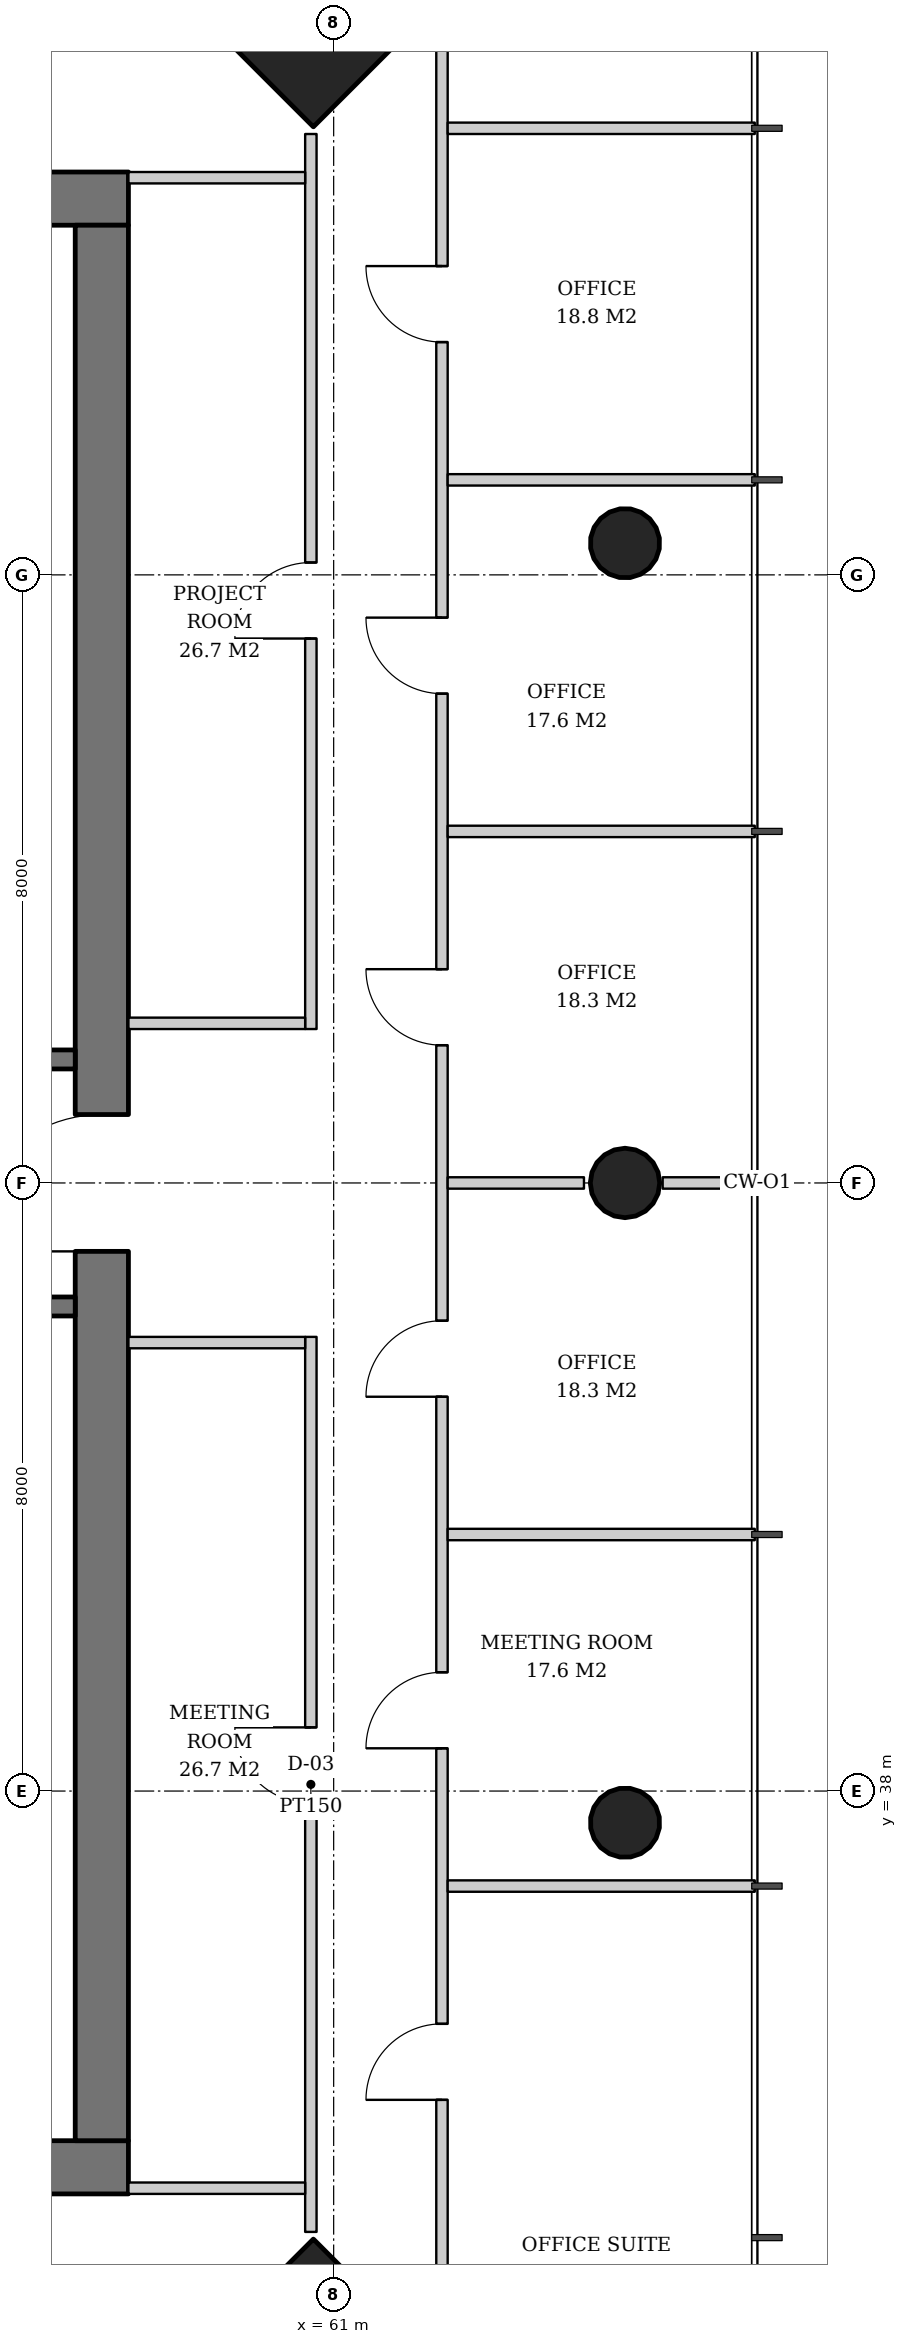
"""IFC4 building model, lengths in metres.
Left out: names, types, materials, properties, quantities, classifications, styles, units other than length and angle.
Written with IfcOpenShell. Run it as: python <this file> out.ifc"""

import sys

from ifc_helpers import new_model, si_unit, direction, frame, frame_2d, origin, origin_2d, place, context, subcontext, project, spatial, rectangle, hollow_circle, extrude, element, fill, save


model = new_model("IFC4")
c1 = context("Model", 3, precision=1e-05, world=origin(), true_north=direction((0.0, 1.0)))
c2 = subcontext(c1, "Body", "Model", "MODEL_VIEW")
j1 = project(units=[si_unit("LENGTHUNIT", "METRE"), si_unit("PLANEANGLEUNIT", "RADIAN")], contexts=[c1])
p1 = place(None, origin())
s1 = spatial("IfcSite", under=j1, at=p1, CompositionType="ELEMENT")
p2 = place(p1, origin())
s2 = spatial("IfcBuilding", under=s1, at=p2, CompositionType="ELEMENT")
p3 = place(p2, frame((0.0, 0.0, 150.2)))
s3 = spatial("IfcBuildingStorey", under=s2, at=p3, CompositionType="ELEMENT", Elevation=150.2)
p4 = place(p3, frame((60.771, 61.771, 0.0), z_axis=(-0.031962158256, -0.031962158256, 0.998977898093), x_axis=(0.707106781187, -0.707106781187, 0.0)))
e1 = element("IfcColumn", 1, at=p4, inside=s3, PredefinedType="COLUMN", context=c2, shape_type="SweptSolid", body=[
    extrude(rectangle(XDim=2.6, YDim=2.6, at=origin_2d()), origin(), (0.0, 0.0, 1.0), 3.804),
])
p5 = place(p3, frame((64.871, 37.564, 0.0), z_axis=(-0.031910269556, 0.015987237665, 0.999362868496), x_axis=(-0.447933021895, -0.894067115991, 0.0)))
e2 = element("IfcColumn", 2, at=p5, inside=s3, PredefinedType="COLUMN", context=c2, shape_type="SweptSolid", body=[
    extrude(hollow_circle(Radius=0.457, WallThickness=0.03, at=origin_2d()), origin(), (0.0, 0.0, 1.0), 3.802),
])
p6 = place(p3, frame((64.871, 46.0, 0.0), z_axis=(-0.031914348339, 0.0, 0.999490607445), x_axis=(0.0, -1.0, 0.0)))
e3 = element("IfcColumn", 3, at=p6, inside=s3, PredefinedType="COLUMN", context=c2, shape_type="SweptSolid", body=[
    extrude(hollow_circle(Radius=0.457, WallThickness=0.03, at=origin_2d()), origin(), (0.0, 0.0, 1.0), 3.802),
])
p7 = place(p3, frame((64.871, 54.436, 0.0), z_axis=(-0.031910269556, -0.015987237665, 0.999362868496), x_axis=(0.447933021895, -0.894067115991, 0.0)))
e4 = element("IfcColumn", 4, at=p7, inside=s3, PredefinedType="COLUMN", context=c2, shape_type="SweptSolid", body=[
    extrude(hollow_circle(Radius=0.457, WallThickness=0.03, at=origin_2d()), origin(), (0.0, 0.0, 1.0), 3.802),
])
p8 = place(p3, frame((60.771, 30.229, 0.0), z_axis=(-0.031962158256, 0.031962158256, 0.998977898093), x_axis=(-0.707106781187, -0.707106781187, 0.0)))
e5 = element("IfcColumn", 5, at=p8, inside=s3, PredefinedType="COLUMN", context=c2, shape_type="SweptSolid", body=[
    extrude(rectangle(XDim=2.6, YDim=2.6, at=origin_2d()), origin(), (0.0, 0.0, 1.0), 3.804),
])
p9 = place(p3, frame((31.7, 33.05, 0.0), z_axis=(0.0, 0.0, 1.0), x_axis=(1.0, 0.0, 0.0)))
e6 = element("IfcWall", 6, at=p9, inside=s3, PredefinedType="SHEAR", context=c2, shape_type="SweptSolid", body=[
    extrude(rectangle(XDim=26.6, YDim=0.7, at=frame_2d((13.3, 0.0))), origin(), (0.0, 0.0, 1.0), 3.8),
])
p10 = place(p9, frame((7.3, 0.0, 0.0)))
e7 = element("IfcOpeningElement", 7, at=p10, cuts=e6, PredefinedType="OPENING", context=c2, shape_type="SweptSolid", body=[
    extrude(rectangle(XDim=1.0, YDim=2.1, at=frame_2d((0.5, 1.05))), frame((0.0, 0.36, 0.0), z_axis=(0.0, -1.0, 0.0), x_axis=(1.0, 0.0, 0.0)), (0.0, 0.0, 1.0), 0.72),
])
p11 = place(p9, frame((18.75, 0.0, 0.0)))
e8 = element("IfcOpeningElement", 8, at=p11, cuts=e6, PredefinedType="OPENING", context=c2, shape_type="SweptSolid", body=[
    extrude(rectangle(XDim=1.0, YDim=2.1, at=frame_2d((0.5, 1.05))), frame((0.0, 0.36, 0.0), z_axis=(0.0, -1.0, 0.0), x_axis=(1.0, 0.0, 0.0)), (0.0, 0.0, 1.0), 0.72),
])
p12 = place(p9, frame((1.85, 0.0, 0.0)))
e9 = element("IfcOpeningElement", 9, at=p12, cuts=e6, PredefinedType="OPENING", context=c2, shape_type="SweptSolid", body=[
    extrude(rectangle(XDim=1.0, YDim=2.1, at=frame_2d((0.5, 1.05))), frame((0.0, 0.36, 0.0), z_axis=(0.0, -1.0, 0.0), x_axis=(1.0, 0.0, 0.0)), (0.0, 0.0, 1.0), 0.72),
])
p13 = place(p9, frame((4.7, 0.0, 0.0)))
e10 = element("IfcOpeningElement", 10, at=p13, cuts=e6, PredefinedType="OPENING", context=c2, shape_type="SweptSolid", body=[
    extrude(rectangle(XDim=1.0, YDim=2.1, at=frame_2d((0.5, 1.05))), frame((0.0, 0.36, 0.0), z_axis=(0.0, -1.0, 0.0), x_axis=(1.0, 0.0, 0.0)), (0.0, 0.0, 1.0), 0.72),
])
p14 = place(p9, frame((12.44, 0.0, 0.0)))
e11 = element("IfcOpeningElement", 11, at=p14, cuts=e6, PredefinedType="OPENING", context=c2, shape_type="SweptSolid", body=[
    extrude(rectangle(XDim=1.0, YDim=2.1, at=frame_2d((0.5, 1.05))), frame((0.0, 0.36, 0.0), z_axis=(0.0, -1.0, 0.0), x_axis=(1.0, 0.0, 0.0)), (0.0, 0.0, 1.0), 0.72),
])
p15 = place(p9, frame((20.644, 0.0, 0.0)))
e12 = element("IfcOpeningElement", 12, at=p15, cuts=e6, PredefinedType="OPENING", context=c2, shape_type="SweptSolid", body=[
    extrude(rectangle(XDim=1.0, YDim=2.1, at=frame_2d((0.5, 1.05))), frame((0.0, 0.36, 0.0), z_axis=(0.0, -1.0, 0.0), x_axis=(1.0, 0.0, 0.0)), (0.0, 0.0, 1.0), 0.72),
])
p16 = place(p9, frame((23.544, 0.0, 0.0)))
e13 = element("IfcOpeningElement", 13, at=p16, cuts=e6, PredefinedType="OPENING", context=c2, shape_type="SweptSolid", body=[
    extrude(rectangle(XDim=1.0, YDim=2.1, at=frame_2d((0.5, 1.05))), frame((0.0, 0.36, 0.0), z_axis=(0.0, -1.0, 0.0), x_axis=(1.0, 0.0, 0.0)), (0.0, 0.0, 1.0), 0.72),
])
p17 = place(p3, frame((31.7, 58.95, 0.0), z_axis=(0.0, 0.0, 1.0), x_axis=(1.0, 0.0, 0.0)))
e14 = element("IfcWall", 14, at=p17, inside=s3, PredefinedType="SHEAR", context=c2, shape_type="SweptSolid", body=[
    extrude(rectangle(XDim=26.6, YDim=0.7, at=frame_2d((13.3, 0.0))), origin(), (0.0, 0.0, 1.0), 3.8),
])
p18 = place(p17, frame((17.94, 0.0, 0.0)))
e15 = element("IfcOpeningElement", 15, at=p18, cuts=e14, PredefinedType="OPENING", context=c2, shape_type="SweptSolid", body=[
    extrude(rectangle(XDim=1.0, YDim=2.1, at=frame_2d((0.5, 1.05))), frame((0.0, 0.36, 0.0), z_axis=(0.0, -1.0, 0.0), x_axis=(1.0, 0.0, 0.0)), (0.0, 0.0, 1.0), 0.72),
])
p19 = place(p17, frame((5.825, 0.0, 0.0)))
e16 = element("IfcOpeningElement", 16, at=p19, cuts=e14, PredefinedType="OPENING", context=c2, shape_type="SweptSolid", body=[
    extrude(rectangle(XDim=1.0, YDim=2.1, at=frame_2d((0.5, 1.05))), frame((0.0, 0.36, 0.0), z_axis=(0.0, -1.0, 0.0), x_axis=(1.0, 0.0, 0.0)), (0.0, 0.0, 1.0), 0.72),
])
p20 = place(p17, frame((1.169, 0.0, 0.0)))
e17 = element("IfcOpeningElement", 17, at=p20, cuts=e14, PredefinedType="OPENING", context=c2, shape_type="SweptSolid", body=[
    extrude(rectangle(XDim=1.0, YDim=2.1, at=frame_2d((0.5, 1.05))), frame((0.0, 0.36, 0.0), z_axis=(0.0, -1.0, 0.0), x_axis=(1.0, 0.0, 0.0)), (0.0, 0.0, 1.0), 0.72),
])
p21 = place(p17, frame((2.683, 0.0, 0.0)))
e18 = element("IfcOpeningElement", 18, at=p21, cuts=e14, PredefinedType="OPENING", context=c2, shape_type="SweptSolid", body=[
    extrude(rectangle(XDim=1.0, YDim=2.1, at=frame_2d((0.5, 1.05))), frame((0.0, 0.36, 0.0), z_axis=(0.0, -1.0, 0.0), x_axis=(1.0, 0.0, 0.0)), (0.0, 0.0, 1.0), 0.72),
])
p22 = place(p17, frame((4.211, 0.0, 0.0)))
e19 = element("IfcOpeningElement", 19, at=p22, cuts=e14, PredefinedType="OPENING", context=c2, shape_type="SweptSolid", body=[
    extrude(rectangle(XDim=1.0, YDim=2.1, at=frame_2d((0.5, 1.05))), frame((0.0, 0.36, 0.0), z_axis=(0.0, -1.0, 0.0), x_axis=(1.0, 0.0, 0.0)), (0.0, 0.0, 1.0), 0.72),
])
p23 = place(p17, frame((8.44, 0.0, 0.0)))
e20 = element("IfcOpeningElement", 20, at=p23, cuts=e14, PredefinedType="OPENING", context=c2, shape_type="SweptSolid", body=[
    extrude(rectangle(XDim=1.0, YDim=2.1, at=frame_2d((0.5, 1.05))), frame((0.0, 0.36, 0.0), z_axis=(0.0, -1.0, 0.0), x_axis=(1.0, 0.0, 0.0)), (0.0, 0.0, 1.0), 0.72),
])
p24 = place(p17, frame((13.342, 0.0, 0.0)))
e21 = element("IfcOpeningElement", 21, at=p24, cuts=e14, PredefinedType="OPENING", context=c2, shape_type="SweptSolid", body=[
    extrude(rectangle(XDim=1.0, YDim=2.1, at=frame_2d((0.5, 1.05))), frame((0.0, 0.36, 0.0), z_axis=(0.0, -1.0, 0.0), x_axis=(1.0, 0.0, 0.0)), (0.0, 0.0, 1.0), 0.72),
])
p25 = place(p17, frame((22.4, 0.0, 0.0)))
e22 = element("IfcOpeningElement", 22, at=p25, cuts=e14, PredefinedType="OPENING", context=c2, shape_type="SweptSolid", body=[
    extrude(rectangle(XDim=1.0, YDim=2.1, at=frame_2d((0.5, 1.05))), frame((0.0, 0.36, 0.0), z_axis=(0.0, -1.0, 0.0), x_axis=(1.0, 0.0, 0.0)), (0.0, 0.0, 1.0), 0.72),
])
p26 = place(p3, frame((57.95, 33.4, 0.0), z_axis=(0.0, 0.0, 1.0), x_axis=(0.0, 1.0, 0.0)))
e23 = element("IfcWall", 23, at=p26, inside=s3, PredefinedType="SHEAR", context=c2, shape_type="SweptSolid", body=[
    extrude(rectangle(XDim=25.2, YDim=0.7, at=frame_2d((12.6, 0.0))), origin(), (0.0, 0.0, 1.0), 3.8),
])
p27 = place(p26, frame((11.7, 0.0, 0.0)))
e24 = element("IfcOpeningElement", 24, at=p27, cuts=e23, PredefinedType="OPENING", context=c2, shape_type="SweptSolid", body=[
    extrude(rectangle(XDim=1.8, YDim=2.4, at=frame_2d((0.9, 1.2))), frame((0.0, 0.36, 0.0), z_axis=(0.0, -1.0, 0.0), x_axis=(1.0, 0.0, 0.0)), (0.0, 0.0, 1.0), 0.72),
])
for number, where, z_axis, x_axis in (
    (25, (54.9, 44.375, 0.0), (0.0, 0.0, 1.0), (1.0, 0.0, 0.0)),
    (26, (54.9, 47.625, 0.0), (0.0, 0.0, 1.0), (1.0, 0.0, 0.0)),
):
    element("IfcWall", number, at=place(p3, frame(where, z_axis=z_axis, x_axis=x_axis)), inside=s3, PredefinedType="SOLIDWALL", context=c2, shape_type="SweptSolid", body=[
        extrude(rectangle(XDim=2.7, YDim=0.25, at=frame_2d((1.35, 0.0))), origin(), (0.0, 0.0, 1.0), 3.62),
    ])
p28 = place(p3, frame((60.7, 32.2, 0.0), z_axis=(0.0, 0.0, 1.0), x_axis=(0.0, 1.0, 0.0)))
e27 = element("IfcWall", 27, at=p28, inside=s3, PredefinedType="PARTITIONING", context=c2, shape_type="SweptSolid", body=[
    extrude(rectangle(XDim=11.775, YDim=0.15, at=frame_2d((5.888, 0.0))), origin(), (0.0, 0.0, 1.0), 2.72),
])
p29 = place(p28, frame((5.637, 0.0, 0.0)))
e28 = element("IfcOpeningElement", 28, at=p29, cuts=e27, PredefinedType="OPENING", context=c2, shape_type="SweptSolid", body=[
    extrude(rectangle(XDim=1.0, YDim=2.1, at=frame_2d((0.5, 1.05))), frame((0.0, 0.085, 0.0), z_axis=(0.0, -1.0, 0.0), x_axis=(1.0, 0.0, 0.0)), (0.0, 0.0, 1.0), 0.17),
])
for number, where, z_axis, x_axis in (
    (29, (58.3, 32.775, 0.0), (0.0, 0.0, 1.0), (1.0, 0.0, 0.0)),
    (30, (58.3, 43.9, 0.0), (0.0, 0.0, 1.0), (1.0, 0.0, 0.0)),
):
    element("IfcWall", number, at=place(p3, frame(where, z_axis=z_axis, x_axis=x_axis)), inside=s3, PredefinedType="PARTITIONING", context=c2, shape_type="SweptSolid", body=[
        extrude(rectangle(XDim=2.325, YDim=0.15, at=frame_2d((1.163, 0.0))), origin(), (0.0, 0.0, 1.0), 3.62),
    ])
p30 = place(p3, frame((60.7, 48.025, 0.0), z_axis=(0.0, 0.0, 1.0), x_axis=(0.0, 1.0, 0.0)))
e31 = element("IfcWall", 31, at=p30, inside=s3, PredefinedType="PARTITIONING", context=c2, shape_type="SweptSolid", body=[
    extrude(rectangle(XDim=11.775, YDim=0.15, at=frame_2d((5.888, 0.0))), origin(), (0.0, 0.0, 1.0), 2.806),
])
p31 = place(p30, frame((5.137, 0.0, 0.0)))
e32 = element("IfcOpeningElement", 32, at=p31, cuts=e31, PredefinedType="OPENING", context=c2, shape_type="SweptSolid", body=[
    extrude(rectangle(XDim=1.0, YDim=2.1, at=frame_2d((0.5, 1.05))), frame((0.0, 0.085, 0.0), z_axis=(0.0, -1.0, 0.0), x_axis=(1.0, 0.0, 0.0)), (0.0, 0.0, 1.0), 0.17),
])
for number, where, z_axis, x_axis in (
    (33, (58.3, 48.1, 0.0), (0.0, 0.0, 1.0), (1.0, 0.0, 0.0)),
    (34, (58.3, 59.225, 0.0), (0.0, 0.0, 1.0), (1.0, 0.0, 0.0)),
):
    element("IfcWall", number, at=place(p3, frame(where, z_axis=z_axis, x_axis=x_axis)), inside=s3, PredefinedType="PARTITIONING", context=c2, shape_type="SweptSolid", body=[
        extrude(rectangle(XDim=2.325, YDim=0.15, at=frame_2d((1.163, 0.0))), origin(), (0.0, 0.0, 1.0), 3.62),
    ])
p32 = place(p3, frame((62.425, 30.489, 0.0), z_axis=(0.0, 0.0, 1.0), x_axis=(0.0, 1.0, 0.0)))
e35 = element("IfcWall", 35, at=p32, inside=s3, PredefinedType="PARTITIONING", context=c2, shape_type="SweptSolid", body=[
    extrude(rectangle(XDim=31.023, YDim=0.15, at=frame_2d((15.511, 0.0))), origin(), (0.0, 0.0, 1.0), 2.72),
])
p33 = place(p32, frame((3.449, 0.0, 0.0)))
e36 = element("IfcOpeningElement", 36, at=p33, cuts=e35, PredefinedType="OPENING", context=c2, shape_type="SweptSolid", body=[
    extrude(rectangle(XDim=1.0, YDim=2.1, at=frame_2d((0.5, 1.05))), frame((0.0, 0.085, 0.0), z_axis=(0.0, -1.0, 0.0), x_axis=(1.0, 0.0, 0.0)), (0.0, 0.0, 1.0), 0.17),
])
p34 = place(p32, frame((8.074, 0.0, 0.0)))
e37 = element("IfcOpeningElement", 37, at=p34, cuts=e35, PredefinedType="OPENING", context=c2, shape_type="SweptSolid", body=[
    extrude(rectangle(XDim=1.0, YDim=2.1, at=frame_2d((0.5, 1.05))), frame((0.0, 0.085, 0.0), z_axis=(0.0, -1.0, 0.0), x_axis=(1.0, 0.0, 0.0)), (0.0, 0.0, 1.0), 0.17),
])
p35 = place(p32, frame((12.699, 0.0, 0.0)))
e38 = element("IfcOpeningElement", 38, at=p35, cuts=e35, PredefinedType="OPENING", context=c2, shape_type="SweptSolid", body=[
    extrude(rectangle(XDim=1.0, YDim=2.1, at=frame_2d((0.5, 1.05))), frame((0.0, 0.085, 0.0), z_axis=(0.0, -1.0, 0.0), x_axis=(1.0, 0.0, 0.0)), (0.0, 0.0, 1.0), 0.17),
])
p36 = place(p32, frame((17.324, 0.0, 0.0)))
e39 = element("IfcOpeningElement", 39, at=p36, cuts=e35, PredefinedType="OPENING", context=c2, shape_type="SweptSolid", body=[
    extrude(rectangle(XDim=1.0, YDim=2.1, at=frame_2d((0.5, 1.05))), frame((0.0, 0.085, 0.0), z_axis=(0.0, -1.0, 0.0), x_axis=(1.0, 0.0, 0.0)), (0.0, 0.0, 1.0), 0.17),
])
p37 = place(p32, frame((21.949, 0.0, 0.0)))
e40 = element("IfcOpeningElement", 40, at=p37, cuts=e35, PredefinedType="OPENING", context=c2, shape_type="SweptSolid", body=[
    extrude(rectangle(XDim=1.0, YDim=2.1, at=frame_2d((0.5, 1.05))), frame((0.0, 0.085, 0.0), z_axis=(0.0, -1.0, 0.0), x_axis=(1.0, 0.0, 0.0)), (0.0, 0.0, 1.0), 0.17),
])
p38 = place(p32, frame((26.574, 0.0, 0.0)))
e41 = element("IfcOpeningElement", 41, at=p38, cuts=e35, PredefinedType="OPENING", context=c2, shape_type="SweptSolid", body=[
    extrude(rectangle(XDim=1.0, YDim=2.1, at=frame_2d((0.5, 1.05))), frame((0.0, 0.085, 0.0), z_axis=(0.0, -1.0, 0.0), x_axis=(1.0, 0.0, 0.0)), (0.0, 0.0, 1.0), 0.17),
])
for number, where, z_axis, x_axis in (
    (42, (62.5, 36.75, 0.0), (0.0, 0.0, 1.0), (1.0, 0.0, 0.0)),
    (43, (62.5, 41.375, 0.0), (0.0, 0.0, 1.0), (1.0, 0.0, 0.0)),
):
    element("IfcWall", number, at=place(p3, frame(where, z_axis=z_axis, x_axis=x_axis)), inside=s3, PredefinedType="PARTITIONING", context=c2, shape_type="SweptSolid", body=[
        extrude(rectangle(XDim=4.04, YDim=0.15, at=frame_2d((2.02, 0.0))), origin(), (0.0, 0.0, 1.0), 2.82),
    ])
p39 = place(p3, frame((62.5, 46.0, 0.0), z_axis=(0.0, 0.0, 1.0), x_axis=(1.0, 0.0, 0.0)))
e44 = element("IfcWall", 44, at=p39, inside=s3, PredefinedType="PARTITIONING", context=c2, shape_type="SweptSolid", body=[
    extrude(rectangle(XDim=1.793, YDim=0.15, at=frame_2d((0.896, 0.0))), origin(), (0.0, 0.0, 1.0), 3.62),
])
p40 = place(p3, frame((65.328, 46.0, 0.0), z_axis=(0.0, 0.0, 1.0), x_axis=(1.0, 0.0, 0.0)))
e45 = element("IfcWall", 45, at=p40, inside=s3, PredefinedType="PARTITIONING", context=c2, shape_type="SweptSolid", body=[
    extrude(rectangle(XDim=1.212, YDim=0.15, at=frame_2d((0.606, 0.0))), origin(), (0.0, 0.0, 1.0), 3.62),
])
for number, where, z_axis, x_axis in (
    (46, (62.5, 50.625, 0.0), (0.0, 0.0, 1.0), (1.0, 0.0, 0.0)),
    (47, (62.5, 55.25, 0.0), (0.0, 0.0, 1.0), (1.0, 0.0, 0.0)),
    (48, (62.5, 59.875, 0.0), (0.0, 0.0, 1.0), (1.0, 0.0, 0.0)),
):
    element("IfcWall", number, at=place(p3, frame(where, z_axis=z_axis, x_axis=x_axis)), inside=s3, PredefinedType="PARTITIONING", context=c2, shape_type="SweptSolid", body=[
        extrude(rectangle(XDim=4.04, YDim=0.15, at=frame_2d((2.02, 0.0))), origin(), (0.0, 0.0, 1.0), 2.82),
    ])
p41 = place(p27, origin())
e49 = element("IfcDoor", 49, at=p41, inside=s3, OperationType="DOUBLE_DOOR_SINGLE_SWING", PredefinedType="DOOR", context=c2, shape_type="SweptSolid", body=[
    extrude(rectangle(XDim=1.8, YDim=2.4, at=frame_2d((0.9, 1.2))), frame((0.0, 0.025, 0.0), z_axis=(0.0, -1.0, 0.0), x_axis=(1.0, 0.0, 0.0)), (0.0, 0.0, 1.0), 0.05),
])
fill(e24, e49)
p42 = place(p29, origin())
e50 = element("IfcDoor", 50, at=p42, inside=s3, OperationType="SINGLE_SWING_RIGHT", PredefinedType="DOOR", context=c2, shape_type="SweptSolid", body=[
    extrude(rectangle(XDim=1.0, YDim=2.1, at=frame_2d((0.5, 1.05))), frame((0.0, 0.025, 0.0), z_axis=(0.0, -1.0, 0.0), x_axis=(1.0, 0.0, 0.0)), (0.0, 0.0, 1.0), 0.05),
])
fill(e28, e50)
p43 = place(p31, origin())
e51 = element("IfcDoor", 51, at=p43, inside=s3, OperationType="SINGLE_SWING_LEFT", PredefinedType="DOOR", context=c2, shape_type="SweptSolid", body=[
    extrude(rectangle(XDim=1.0, YDim=2.1, at=frame_2d((0.5, 1.05))), frame((0.0, 0.025, 0.0), z_axis=(0.0, -1.0, 0.0), x_axis=(1.0, 0.0, 0.0)), (0.0, 0.0, 1.0), 0.05),
])
fill(e32, e51)
p44 = place(p33, origin())
e52 = element("IfcDoor", 52, at=p44, inside=s3, OperationType="SINGLE_SWING_LEFT", PredefinedType="DOOR", context=c2, shape_type="SweptSolid", body=[
    extrude(rectangle(XDim=1.0, YDim=2.1, at=frame_2d((0.5, 1.05))), frame((0.0, 0.025, 0.0), z_axis=(0.0, -1.0, 0.0), x_axis=(1.0, 0.0, 0.0)), (0.0, 0.0, 1.0), 0.05),
])
fill(e36, e52)
p45 = place(p34, origin())
e53 = element("IfcDoor", 53, at=p45, inside=s3, OperationType="SINGLE_SWING_LEFT", PredefinedType="DOOR", context=c2, shape_type="SweptSolid", body=[
    extrude(rectangle(XDim=1.0, YDim=2.1, at=frame_2d((0.5, 1.05))), frame((0.0, 0.025, 0.0), z_axis=(0.0, -1.0, 0.0), x_axis=(1.0, 0.0, 0.0)), (0.0, 0.0, 1.0), 0.05),
])
fill(e37, e53)
p46 = place(p35, origin())
e54 = element("IfcDoor", 54, at=p46, inside=s3, OperationType="SINGLE_SWING_LEFT", PredefinedType="DOOR", context=c2, shape_type="SweptSolid", body=[
    extrude(rectangle(XDim=1.0, YDim=2.1, at=frame_2d((0.5, 1.05))), frame((0.0, 0.025, 0.0), z_axis=(0.0, -1.0, 0.0), x_axis=(1.0, 0.0, 0.0)), (0.0, 0.0, 1.0), 0.05),
])
fill(e38, e54)
p47 = place(p36, origin())
e55 = element("IfcDoor", 55, at=p47, inside=s3, OperationType="SINGLE_SWING_RIGHT", PredefinedType="DOOR", context=c2, shape_type="SweptSolid", body=[
    extrude(rectangle(XDim=1.0, YDim=2.1, at=frame_2d((0.5, 1.05))), frame((0.0, 0.025, 0.0), z_axis=(0.0, -1.0, 0.0), x_axis=(1.0, 0.0, 0.0)), (0.0, 0.0, 1.0), 0.05),
])
fill(e39, e55)
p48 = place(p37, origin())
e56 = element("IfcDoor", 56, at=p48, inside=s3, OperationType="SINGLE_SWING_RIGHT", PredefinedType="DOOR", context=c2, shape_type="SweptSolid", body=[
    extrude(rectangle(XDim=1.0, YDim=2.1, at=frame_2d((0.5, 1.05))), frame((0.0, 0.025, 0.0), z_axis=(0.0, -1.0, 0.0), x_axis=(1.0, 0.0, 0.0)), (0.0, 0.0, 1.0), 0.05),
])
fill(e40, e56)
p49 = place(p38, origin())
e57 = element("IfcDoor", 57, at=p49, inside=s3, OperationType="SINGLE_SWING_RIGHT", PredefinedType="DOOR", context=c2, shape_type="SweptSolid", body=[
    extrude(rectangle(XDim=1.0, YDim=2.1, at=frame_2d((0.5, 1.05))), frame((0.0, 0.025, 0.0), z_axis=(0.0, -1.0, 0.0), x_axis=(1.0, 0.0, 0.0)), (0.0, 0.0, 1.0), 0.05),
])
fill(e41, e57)
save(model, sys.argv[1])
